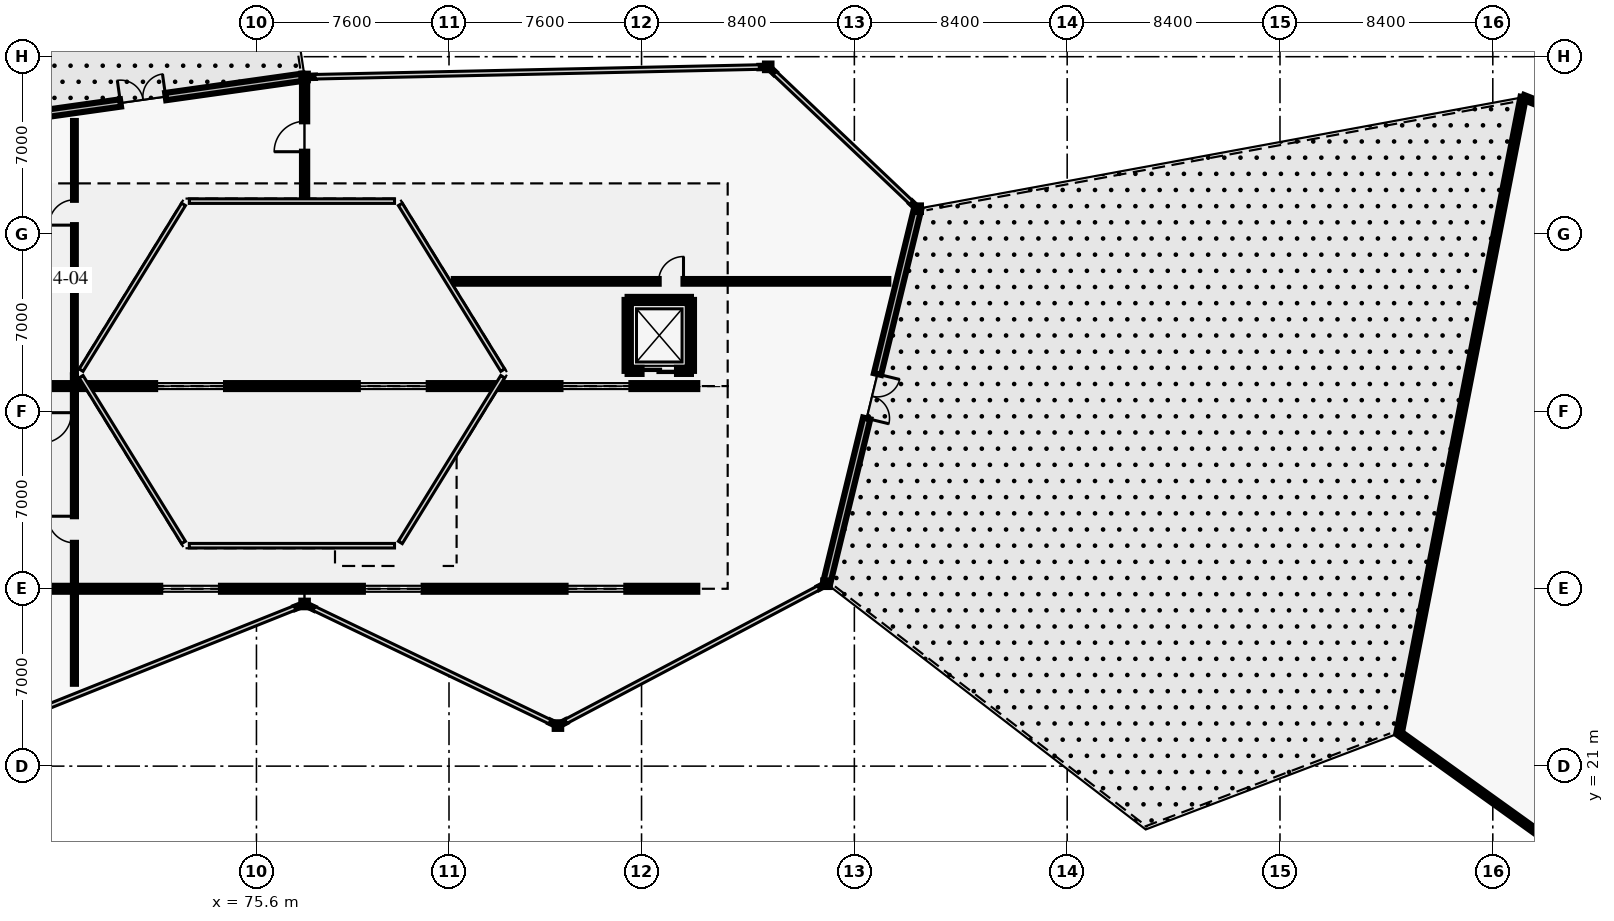
"""IFC4 building model, lengths in metres.
Left out: names, types, materials, properties, quantities, classifications, styles, units other than length and angle.
Written with IfcOpenShell. Run it as: python <this file> out.ifc"""

import sys

from ifc_helpers import new_model, si_unit, direction, frame, frame_2d, origin, origin_2d, place, context, subcontext, project, spatial, rectangle, i_section, extrude, element, fill, save


model = new_model("IFC4")
c1 = context("Model", 3, precision=1e-05, world=origin(), true_north=direction((0.0, 1.0)))
c2 = subcontext(c1, "Body", "Model", "MODEL_VIEW")
j1 = project(units=[si_unit("LENGTHUNIT", "METRE"), si_unit("PLANEANGLEUNIT", "RADIAN")], contexts=[c1])
p1 = place(None, origin())
s1 = spatial("IfcSite", under=j1, at=p1, CompositionType="ELEMENT")
p2 = place(p1, origin())
s2 = spatial("IfcBuilding", under=s1, at=p2, CompositionType="ELEMENT")
p3 = place(p2, frame((0.0, 0.0, 19.8)))
s3 = spatial("IfcBuildingStorey", under=s2, at=p3, CompositionType="ELEMENT", Elevation=19.8)
for number, where, z_axis, x_axis in (
    (1, (77.5, 27.4, 0.0), (0.0, 0.0, 1.0), (1.0, 0.0, 0.0)),
    (2, (77.5, 48.2, 0.0), (0.0, 0.0, 1.0), (1.0, 0.0, 0.0)),
    (3, (87.5, 22.6, 0.0), (0.0, 0.0, 1.0), (1.0, 0.0, 0.0)),
    (4, (95.8, 48.6, 0.0), (0.0, 0.0, 1.0), (1.0, 0.0, 0.0)),
    (5, (98.1, 28.2, 0.0), (0.0, 0.0, 1.0), (1.0, 0.0, 0.0)),
    (6, (101.7, 43.0, 0.0), (0.0, 0.0, 1.0), (1.0, 0.0, 0.0)),
):
    element("IfcColumn", number, at=place(p3, frame(where, z_axis=z_axis, x_axis=x_axis)), inside=s3, PredefinedType="COLUMN", context=c2, shape_type="SweptSolid", body=[
        extrude(i_section(OverallWidth=0.256, OverallDepth=0.26, WebThickness=0.01, FlangeThickness=0.017, FilletRadius=0.013, at=origin_2d()), origin(), (0.0, 0.0, 1.0), 9.0),
    ])
p4 = place(p3, frame((77.405, 27.362, 0.0), z_axis=(0.0, 0.0, 1.0), x_axis=(-0.928967856381, -0.370160400111, 0.0)))
e7 = element("IfcWall", 7, at=p4, inside=s3, PredefinedType="SOLIDWALL", context=c2, shape_type="SweptSolid", body=[
    extrude(rectangle(XDim=0.308, YDim=0.095, at=frame_2d((0.154, 0.0))), origin(), (0.0, 0.0, 1.0), 7.82),
])
p5 = place(p3, frame((52.0, 44.6, 0.0), z_axis=(0.0, 0.0, 1.0), x_axis=(0.990179648472, 0.139800800256, 0.0)))
e8 = element("IfcWall", 8, at=p5, inside=s3, PredefinedType="SOLIDWALL", context=c2, shape_type="SweptSolid", body=[
    extrude(rectangle(XDim=25.692, YDim=0.29, at=frame_2d((12.846, 0.0))), origin(), (0.0, 0.0, 1.0), 7.82),
])
p6 = place(p5, frame((18.415, 0.0, 0.0)))
e9 = element("IfcOpeningElement", 9, at=p6, cuts=e8, PredefinedType="OPENING", context=c2, shape_type="SweptSolid", body=[
    extrude(rectangle(XDim=1.8, YDim=2.25, at=frame_2d((0.9, 1.125))), frame((0.0, 0.155, 0.0), z_axis=(0.0, -1.0, 0.0), x_axis=(1.0, 0.0, 0.0)), (0.0, 0.0, 1.0), 0.31),
])
p7 = place(p3, frame((87.462, 22.618, 0.0), z_axis=(0.0, 0.0, 1.0), x_axis=(-0.901906089125, 0.431932178008, 0.0)))
e10 = element("IfcWall", 10, at=p7, inside=s3, PredefinedType="SOLIDWALL", context=c2, shape_type="SweptSolid", body=[
    extrude(rectangle(XDim=0.308, YDim=0.095, at=frame_2d((0.154, 0.0))), origin(), (0.0, 0.0, 1.0), 7.82),
])
p8 = place(p3, frame((77.87, 27.223, 0.0), z_axis=(0.0, 0.0, 1.0), x_axis=(-0.902053790555, 0.431623631126, 0.0)))
e11 = element("IfcWall", 11, at=p8, inside=s3, PredefinedType="SOLIDWALL", context=c2, shape_type="SweptSolid", body=[
    extrude(rectangle(XDim=0.308, YDim=0.095, at=frame_2d((0.154, 0.0))), origin(), (0.0, 0.0, 1.0), 7.82),
])
for number, where, z_axis, x_axis in (
    (12, (98.063, 28.18, 0.0), (0.0, 0.0, 1.0), (-0.885, -0.465, 0.0)),
    (13, (87.809, 22.763, 0.0), (0.0, 0.0, 1.0), (-0.885, -0.465, 0.0)),
):
    element("IfcWall", number, at=place(p3, frame(where, z_axis=z_axis, x_axis=x_axis)), inside=s3, PredefinedType="SOLIDWALL", context=c2, shape_type="SweptSolid", body=[
        extrude(rectangle(XDim=0.307, YDim=0.095, at=frame_2d((0.154, 0.0))), origin(), (0.0, 0.0, 1.0), 7.82),
    ])
p9 = place(p3, frame((101.7, 43.0, 0.0), z_axis=(0.0, 0.0, 1.0), x_axis=(-0.236341762997, -0.971669990822, 0.0)))
e14 = element("IfcWall", 14, at=p9, inside=s3, PredefinedType="SOLIDWALL", context=c2, shape_type="SweptSolid", body=[
    extrude(rectangle(XDim=15.231, YDim=0.29, at=frame_2d((7.616, 0.0))), origin(), (0.0, 0.0, 1.0), 7.82),
])
p10 = place(p9, frame((6.716, 0.0, 0.0)))
e15 = element("IfcOpeningElement", 15, at=p10, cuts=e14, PredefinedType="OPENING", context=c2, shape_type="SweptSolid", body=[
    extrude(rectangle(XDim=1.8, YDim=2.25, at=frame_2d((0.9, 1.125))), frame((0.0, 0.155, 0.0), z_axis=(0.0, -1.0, 0.0), x_axis=(1.0, 0.0, 0.0)), (0.0, 0.0, 1.0), 0.31),
])
for number, where, z_axis, x_axis in (
    (16, (95.83, 48.571, 0.0), (0.0, 0.0, 1.0), (0.726, -0.688, 0.0)),
    (17, (101.446, 43.241, 0.0), (0.0, 0.0, 1.0), (0.726, -0.687, 0.0)),
):
    element("IfcWall", number, at=place(p3, frame(where, z_axis=z_axis, x_axis=x_axis)), inside=s3, PredefinedType="SOLIDWALL", context=c2, shape_type="SweptSolid", body=[
        extrude(rectangle(XDim=0.308, YDim=0.095, at=frame_2d((0.154, 0.0))), origin(), (0.0, 0.0, 1.0), 7.82),
    ])
p11 = place(p3, frame((77.602, 48.202, 0.0), z_axis=(0.0, 0.0, 1.0), x_axis=(0.999735659566, 0.022991541735, 0.0)))
e18 = element("IfcWall", 18, at=p11, inside=s3, PredefinedType="SOLIDWALL", context=c2, shape_type="SweptSolid", body=[
    extrude(rectangle(XDim=0.308, YDim=0.095, at=frame_2d((0.154, 0.0))), origin(), (0.0, 0.0, 1.0), 7.82),
])
p12 = place(p3, frame((95.45, 48.592, 0.0), z_axis=(0.0, 0.0, 1.0), x_axis=(0.999736078158, 0.022973333016, 0.0)))
e19 = element("IfcWall", 19, at=p12, inside=s3, PredefinedType="SOLIDWALL", context=c2, shape_type="SweptSolid", body=[
    extrude(rectangle(XDim=0.308, YDim=0.095, at=frame_2d((0.154, 0.0))), origin(), (0.0, 0.0, 1.0), 7.82),
])
p13 = place(p3, frame((93.0, 28.0, 8.65), z_axis=(0.0, 0.0, 1.0), x_axis=(-1.0, 0.0, 0.0)))
e20 = element("IfcWall", 20, at=p13, inside=s3, PredefinedType="SOLIDWALL", context=c2, shape_type="SweptSolid", body=[
    extrude(rectangle(XDim=32.0, YDim=0.235, at=frame_2d((16.0, 0.0))), origin(), (0.0, 0.0, 1.0), 3.93),
])
p14 = place(p13, frame((2.8, 0.0, 0.25)))
e21 = element("IfcOpeningElement", 21, at=p14, cuts=e20, PredefinedType="OPENING", context=c2, shape_type="SweptSolid", body=[
    extrude(rectangle(XDim=2.4, YDim=2.2, at=frame_2d((1.2, 1.1))), frame((0.0, 0.127, 0.0), z_axis=(0.0, -1.0, 0.0), x_axis=(1.0, 0.0, 0.0)), (0.0, 0.0, 1.0), 0.255),
])
p15 = place(p13, frame((10.8, 0.0, 0.25)))
e22 = element("IfcOpeningElement", 22, at=p15, cuts=e20, PredefinedType="OPENING", context=c2, shape_type="SweptSolid", body=[
    extrude(rectangle(XDim=2.4, YDim=2.2, at=frame_2d((1.2, 1.1))), frame((0.0, 0.127, 0.0), z_axis=(0.0, -1.0, 0.0), x_axis=(1.0, 0.0, 0.0)), (0.0, 0.0, 1.0), 0.255),
])
p16 = place(p13, frame((18.8, 0.0, 0.25)))
e23 = element("IfcOpeningElement", 23, at=p16, cuts=e20, PredefinedType="OPENING", context=c2, shape_type="SweptSolid", body=[
    extrude(rectangle(XDim=2.4, YDim=2.2, at=frame_2d((1.2, 1.1))), frame((0.0, 0.127, 0.0), z_axis=(0.0, -1.0, 0.0), x_axis=(1.0, 0.0, 0.0)), (0.0, 0.0, 1.0), 0.255),
])
p17 = place(p13, frame((26.8, 0.0, 0.25)))
e24 = element("IfcOpeningElement", 24, at=p17, cuts=e20, PredefinedType="OPENING", context=c2, shape_type="SweptSolid", body=[
    extrude(rectangle(XDim=2.4, YDim=2.2, at=frame_2d((1.2, 1.1))), frame((0.0, 0.127, 0.0), z_axis=(0.0, -1.0, 0.0), x_axis=(1.0, 0.0, 0.0)), (0.0, 0.0, 1.0), 0.255),
])
p18 = place(p3, frame((93.0, 36.0, 8.65), z_axis=(0.0, 0.0, 1.0), x_axis=(-1.0, 0.0, 0.0)))
e25 = element("IfcWall", 25, at=p18, inside=s3, PredefinedType="SOLIDWALL", context=c2, shape_type="SweptSolid", body=[
    extrude(rectangle(XDim=32.0, YDim=0.235, at=frame_2d((16.0, 0.0))), origin(), (0.0, 0.0, 1.0), 3.93),
])
p19 = place(p18, frame((2.6, 0.0, 0.25)))
e26 = element("IfcOpeningElement", 26, at=p19, cuts=e25, PredefinedType="OPENING", context=c2, shape_type="SweptSolid", body=[
    extrude(rectangle(XDim=2.8, YDim=2.2, at=frame_2d((1.4, 1.1))), frame((0.0, 0.127, 0.0), z_axis=(0.0, -1.0, 0.0), x_axis=(1.0, 0.0, 0.0)), (0.0, 0.0, 1.0), 0.255),
])
p20 = place(p18, frame((10.6, 0.0, 0.25)))
e27 = element("IfcOpeningElement", 27, at=p20, cuts=e25, PredefinedType="OPENING", context=c2, shape_type="SweptSolid", body=[
    extrude(rectangle(XDim=2.8, YDim=2.2, at=frame_2d((1.4, 1.1))), frame((0.0, 0.127, 0.0), z_axis=(0.0, -1.0, 0.0), x_axis=(1.0, 0.0, 0.0)), (0.0, 0.0, 1.0), 0.255),
])
p21 = place(p18, frame((18.6, 0.0, 0.25)))
e28 = element("IfcOpeningElement", 28, at=p21, cuts=e25, PredefinedType="OPENING", context=c2, shape_type="SweptSolid", body=[
    extrude(rectangle(XDim=2.8, YDim=2.2, at=frame_2d((1.4, 1.1))), frame((0.0, 0.127, 0.0), z_axis=(0.0, -1.0, 0.0), x_axis=(1.0, 0.0, 0.0)), (0.0, 0.0, 1.0), 0.255),
])
p22 = place(p18, frame((26.6, 0.0, 0.25)))
e29 = element("IfcOpeningElement", 29, at=p22, cuts=e25, PredefinedType="OPENING", context=c2, shape_type="SweptSolid", body=[
    extrude(rectangle(XDim=2.8, YDim=2.2, at=frame_2d((1.4, 1.1))), frame((0.0, 0.127, 0.0), z_axis=(0.0, -1.0, 0.0), x_axis=(1.0, 0.0, 0.0)), (0.0, 0.0, 1.0), 0.255),
])
p23 = place(p3, frame((137.5, 42.7, 0.0), z_axis=(0.0, 0.0, 1.0), x_axis=(-0.93008523402, 0.36734378647, 0.0)))
e30 = element("IfcWall", 30, at=p23, inside=s3, PredefinedType="PARAPET", context=c2, shape_type="SweptSolid", body=[
    extrude(rectangle(XDim=12.794, YDim=0.195, at=frame_2d((6.397, 0.0))), origin(), (0.0, 0.0, 1.0), 0.95),
])
p24 = place(p3, frame((125.6, 47.4, 0.0), z_axis=(0.0, 0.0, 1.0), x_axis=(-0.191608827438, -0.981471373626, 0.0)))
e31 = element("IfcWall", 31, at=p24, inside=s3, PredefinedType="PARAPET", context=c2, shape_type="SweptSolid", body=[
    extrude(rectangle(XDim=25.574, YDim=0.215, at=frame_2d((12.787, 0.0))), origin(), (0.0, 0.0, 1.0), 0.95),
])
p25 = place(p3, frame((120.7, 22.3, 0.0), z_axis=(0.0, 0.0, 1.0), x_axis=(0.812532700231, -0.582915612293, 0.0)))
e32 = element("IfcWall", 32, at=p25, inside=s3, PredefinedType="PARAPET", context=c2, shape_type="SweptSolid", body=[
    extrude(rectangle(XDim=11.323, YDim=0.195, at=frame_2d((5.661, 0.0))), origin(), (0.0, 0.0, 1.0), 0.95),
])
p26 = place(p3, frame((77.5, 43.5, 0.0), z_axis=(0.0, 0.0, 1.0), x_axis=(0.0, 1.0, 0.0)))
e33 = element("IfcWall", 33, at=p26, inside=s3, PredefinedType="SOLIDWALL", context=c2, shape_type="SweptSolid", body=[
    extrude(rectangle(XDim=4.7, YDim=0.205, at=frame_2d((2.35, 0.0))), origin(), (0.0, 0.0, 1.0), 7.52),
])
p27 = place(p26, frame((1.75, 0.0, 0.0)))
e34 = element("IfcOpeningElement", 34, at=p27, cuts=e33, PredefinedType="OPENING", context=c2, shape_type="SweptSolid", body=[
    extrude(rectangle(XDim=1.2, YDim=2.2, at=frame_2d((0.6, 1.1))), frame((0.0, 0.113, 0.0), z_axis=(0.0, -1.0, 0.0), x_axis=(1.0, 0.0, 0.0)), (0.0, 0.0, 1.0), 0.225),
])
p28 = place(p3, frame((68.415, 24.251, 0.0), z_axis=(0.0, 0.0, 1.0), x_axis=(0.0, 1.0, 0.0)))
e35 = element("IfcWall", 35, at=p28, inside=s3, PredefinedType="PARTITIONING", context=c2, shape_type="SweptSolid", body=[
    extrude(rectangle(XDim=12.174, YDim=0.12, at=frame_2d((6.087, 0.0))), origin(), (0.0, 0.0, 1.0), 7.52),
])
p29 = place(p28, frame((5.562, 0.0, 0.0)))
e36 = element("IfcOpeningElement", 36, at=p29, cuts=e35, PredefinedType="OPENING", context=c2, shape_type="SweptSolid", body=[
    extrude(rectangle(XDim=1.05, YDim=2.2, at=frame_2d((0.525, 1.1))), frame((0.0, 0.07, 0.0), z_axis=(0.0, -1.0, 0.0), x_axis=(1.0, 0.0, 0.0)), (0.0, 0.0, 1.0), 0.14),
])
p30 = place(p3, frame((68.415, 36.575, 0.0), z_axis=(0.0, 0.0, 1.0), x_axis=(0.0, 1.0, 0.0)))
e37 = element("IfcWall", 37, at=p30, inside=s3, PredefinedType="PARTITIONING", context=c2, shape_type="SweptSolid", body=[
    extrude(rectangle(XDim=9.888, YDim=0.11, at=frame_2d((4.944, 0.0))), origin(), (0.0, 0.0, 1.0), 7.52),
])
p31 = place(p30, frame((5.777, 0.0, 0.0)))
e38 = element("IfcOpeningElement", 38, at=p31, cuts=e37, PredefinedType="OPENING", context=c2, shape_type="SweptSolid", body=[
    extrude(rectangle(XDim=1.0, YDim=2.15, at=frame_2d((0.5, 1.075))), frame((0.0, 0.065, 0.0), z_axis=(0.0, -1.0, 0.0), x_axis=(1.0, 0.0, 0.0)), (0.0, 0.0, 1.0), 0.13),
])
p32 = place(p3, frame((83.391, 40.133, 0.0), z_axis=(0.0, 0.0, 1.0), x_axis=(1.0, 0.0, 0.0)))
e39 = element("IfcWall", 39, at=p32, inside=s3, PredefinedType="PARTITIONING", context=c2, shape_type="SweptSolid", body=[
    extrude(rectangle(XDim=17.149, YDim=0.185, at=frame_2d((8.574, 0.0))), origin(), (0.0, 0.0, 1.0), 7.52),
])
p33 = place(p32, frame((8.085, 0.0, 0.0)))
e40 = element("IfcOpeningElement", 40, at=p33, cuts=e39, PredefinedType="OPENING", context=c2, shape_type="SweptSolid", body=[
    extrude(rectangle(XDim=0.98, YDim=2.15, at=frame_2d((0.49, 1.075))), frame((0.0, 0.103, 0.0), z_axis=(0.0, -1.0, 0.0), x_axis=(1.0, 0.0, 0.0)), (0.0, 0.0, 1.0), 0.205),
])
p34 = place(p3, frame((90.25, 39.4, 0.0), z_axis=(0.0, 0.0, 1.0), x_axis=(1.0, 0.0, 0.0)))
e41 = element("IfcWall", 41, at=p34, inside=s3, PredefinedType="SHEAR", context=c2, shape_type="SweptSolid", body=[
    extrude(rectangle(XDim=2.5, YDim=0.24, at=frame_2d((1.25, 0.0))), origin(), (0.0, 0.0, 1.0), 10.1),
])
for number, where, z_axis, x_axis in (
    (42, (92.75, 39.4, 0.0), (0.0, 0.0, 1.0), (0.0, -1.0, 0.0)),
    (43, (90.25, 36.6, 0.0), (0.0, 0.0, 1.0), (0.0, 1.0, 0.0)),
):
    element("IfcWall", number, at=place(p3, frame(where, z_axis=z_axis, x_axis=x_axis)), inside=s3, PredefinedType="SHEAR", context=c2, shape_type="SweptSolid", body=[
        extrude(rectangle(XDim=2.8, YDim=0.24, at=frame_2d((1.4, 0.0))), origin(), (0.0, 0.0, 1.0), 10.1),
    ])
p35 = place(p3, frame((92.75, 36.6, 0.0), z_axis=(0.0, 0.0, 1.0), x_axis=(-1.0, 0.0, 0.0)))
e44 = element("IfcWall", 44, at=p35, inside=s3, PredefinedType="SHEAR", context=c2, shape_type="SweptSolid", body=[
    extrude(rectangle(XDim=2.5, YDim=0.24, at=frame_2d((1.25, 0.0))), origin(), (0.0, 0.0, 1.0), 10.1),
])
p36 = place(p35, frame((0.55, 0.0, 0.0)))
e45 = element("IfcOpeningElement", 45, at=p36, cuts=e44, PredefinedType="OPENING", context=c2, shape_type="SweptSolid", body=[
    extrude(rectangle(XDim=1.4, YDim=2.3, at=frame_2d((0.7, 1.15))), frame((0.0, 0.13, 0.0), z_axis=(0.0, -1.0, 0.0), x_axis=(1.0, 0.0, 0.0)), (0.0, 0.0, 1.0), 0.26),
])
p37 = place(p10, origin())
e46 = element("IfcDoor", 46, at=p37, inside=s3, OperationType="DOUBLE_DOOR_SINGLE_SWING", PredefinedType="DOOR", context=c2, shape_type="SweptSolid", body=[
    extrude(rectangle(XDim=1.8, YDim=2.25, at=frame_2d((0.9, 1.125))), frame((0.0, 0.025, 0.0), z_axis=(0.0, -1.0, 0.0), x_axis=(1.0, 0.0, 0.0)), (0.0, 0.0, 1.0), 0.05),
])
fill(e15, e46)
p38 = place(p6, origin())
e47 = element("IfcDoor", 47, at=p38, inside=s3, OperationType="DOUBLE_DOOR_SINGLE_SWING", PredefinedType="DOOR", context=c2, shape_type="SweptSolid", body=[
    extrude(rectangle(XDim=1.8, YDim=2.25, at=frame_2d((0.9, 1.125))), frame((0.0, 0.025, 0.0), z_axis=(0.0, -1.0, 0.0), x_axis=(1.0, 0.0, 0.0)), (0.0, 0.0, 1.0), 0.05),
])
fill(e9, e47)
p39 = place(p14, origin())
e48 = element("IfcWindow", 48, at=p39, inside=s3, PartitioningType="SINGLE_PANEL", PredefinedType="SKYLIGHT", context=c2, shape_type="SweptSolid", body=[
    extrude(rectangle(XDim=2.4, YDim=2.2, at=frame_2d((1.2, 1.1))), frame((0.0, 0.03, 0.0), z_axis=(0.0, -1.0, 0.0), x_axis=(1.0, 0.0, 0.0)), (0.0, 0.0, 1.0), 0.06),
])
fill(e21, e48)
p40 = place(p15, origin())
e49 = element("IfcWindow", 49, at=p40, inside=s3, PartitioningType="SINGLE_PANEL", PredefinedType="SKYLIGHT", context=c2, shape_type="SweptSolid", body=[
    extrude(rectangle(XDim=2.4, YDim=2.2, at=frame_2d((1.2, 1.1))), frame((0.0, 0.03, 0.0), z_axis=(0.0, -1.0, 0.0), x_axis=(1.0, 0.0, 0.0)), (0.0, 0.0, 1.0), 0.06),
])
fill(e22, e49)
p41 = place(p16, origin())
e50 = element("IfcWindow", 50, at=p41, inside=s3, PartitioningType="SINGLE_PANEL", PredefinedType="SKYLIGHT", context=c2, shape_type="SweptSolid", body=[
    extrude(rectangle(XDim=2.4, YDim=2.2, at=frame_2d((1.2, 1.1))), frame((0.0, 0.03, 0.0), z_axis=(0.0, -1.0, 0.0), x_axis=(1.0, 0.0, 0.0)), (0.0, 0.0, 1.0), 0.06),
])
fill(e23, e50)
p42 = place(p19, origin())
e51 = element("IfcWindow", 51, at=p42, inside=s3, PartitioningType="SINGLE_PANEL", PredefinedType="SKYLIGHT", context=c2, shape_type="SweptSolid", body=[
    extrude(rectangle(XDim=2.8, YDim=2.2, at=frame_2d((1.4, 1.1))), frame((0.0, 0.03, 0.0), z_axis=(0.0, -1.0, 0.0), x_axis=(1.0, 0.0, 0.0)), (0.0, 0.0, 1.0), 0.06),
])
fill(e26, e51)
p43 = place(p20, origin())
e52 = element("IfcWindow", 52, at=p43, inside=s3, PartitioningType="SINGLE_PANEL", PredefinedType="SKYLIGHT", context=c2, shape_type="SweptSolid", body=[
    extrude(rectangle(XDim=2.8, YDim=2.2, at=frame_2d((1.4, 1.1))), frame((0.0, 0.03, 0.0), z_axis=(0.0, -1.0, 0.0), x_axis=(1.0, 0.0, 0.0)), (0.0, 0.0, 1.0), 0.06),
])
fill(e27, e52)
p44 = place(p21, origin())
e53 = element("IfcWindow", 53, at=p44, inside=s3, PartitioningType="SINGLE_PANEL", PredefinedType="SKYLIGHT", context=c2, shape_type="SweptSolid", body=[
    extrude(rectangle(XDim=2.8, YDim=2.2, at=frame_2d((1.4, 1.1))), frame((0.0, 0.03, 0.0), z_axis=(0.0, -1.0, 0.0), x_axis=(1.0, 0.0, 0.0)), (0.0, 0.0, 1.0), 0.06),
])
fill(e28, e53)
p45 = place(p27, origin())
e54 = element("IfcDoor", 54, at=p45, inside=s3, OperationType="SINGLE_SWING_LEFT", PredefinedType="DOOR", context=c2, shape_type="SweptSolid", body=[
    extrude(rectangle(XDim=1.2, YDim=2.2, at=frame_2d((0.6, 1.1))), frame((0.0, 0.025, 0.0), z_axis=(0.0, -1.0, 0.0), x_axis=(1.0, 0.0, 0.0)), (0.0, 0.0, 1.0), 0.05),
])
fill(e34, e54)
p46 = place(p29, origin())
e55 = element("IfcDoor", 55, at=p46, inside=s3, OperationType="SINGLE_SWING_RIGHT", PredefinedType="DOOR", context=c2, shape_type="SweptSolid", body=[
    extrude(rectangle(XDim=1.05, YDim=2.2, at=frame_2d((0.525, 1.1))), frame((0.0, 0.025, 0.0), z_axis=(0.0, -1.0, 0.0), x_axis=(1.0, 0.0, 0.0)), (0.0, 0.0, 1.0), 0.05),
])
fill(e36, e55)
p47 = place(p31, origin())
e56 = element("IfcDoor", 56, at=p47, inside=s3, OperationType="SINGLE_SWING_LEFT", PredefinedType="DOOR", context=c2, shape_type="SweptSolid", body=[
    extrude(rectangle(XDim=1.0, YDim=2.15, at=frame_2d((0.5, 1.075))), frame((0.0, 0.025, 0.0), z_axis=(0.0, -1.0, 0.0), x_axis=(1.0, 0.0, 0.0)), (0.0, 0.0, 1.0), 0.05),
])
fill(e38, e56)
p48 = place(p33, origin())
e57 = element("IfcDoor", 57, at=p48, inside=s3, OperationType="SINGLE_SWING_RIGHT", PredefinedType="DOOR", context=c2, shape_type="SweptSolid", body=[
    extrude(rectangle(XDim=0.98, YDim=2.15, at=frame_2d((0.49, 1.075))), frame((0.0, 0.025, 0.0), z_axis=(0.0, -1.0, 0.0), x_axis=(1.0, 0.0, 0.0)), (0.0, 0.0, 1.0), 0.05),
])
fill(e40, e57)
p49 = place(p36, origin())
e58 = element("IfcDoor", 58, at=p49, inside=s3, OperationType="SLIDING_TO_LEFT", PredefinedType="DOOR", context=c2, shape_type="SweptSolid", body=[
    extrude(rectangle(XDim=1.4, YDim=2.3, at=frame_2d((0.7, 1.15))), frame((0.0, 0.025, 0.0), z_axis=(0.0, -1.0, 0.0), x_axis=(1.0, 0.0, 0.0)), (0.0, 0.0, 1.0), 0.05),
])
fill(e45, e58)
save(model, sys.argv[1])
